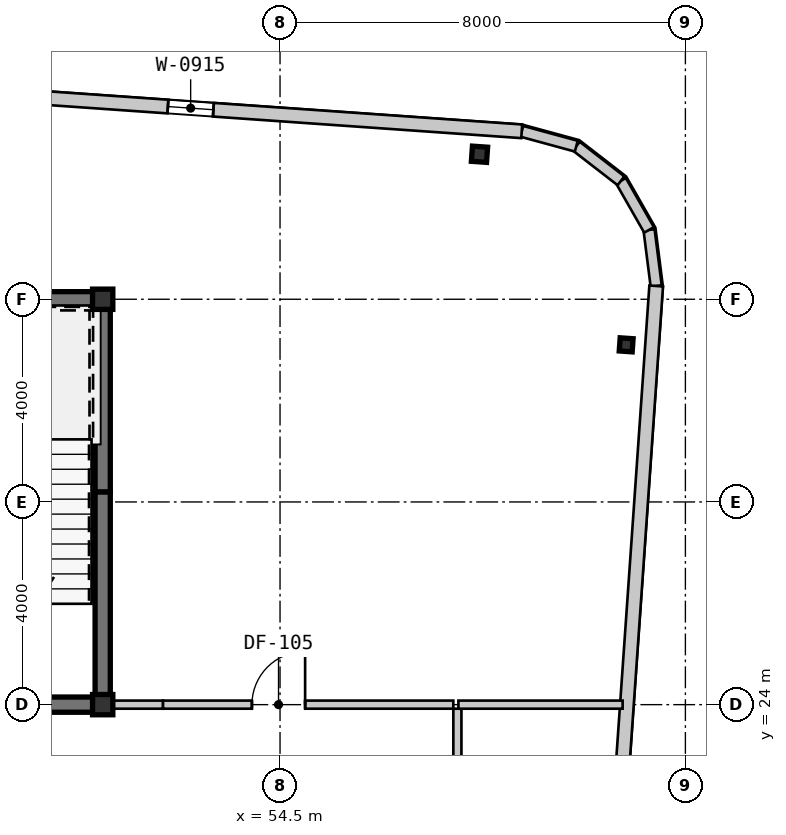
"""IFC4 building model, lengths in metres.
Left out: names, types, materials, properties, quantities, classifications, styles, units other than length and angle.
Written with IfcOpenShell. Run it as: python <this file> out.ifc"""

import sys

from ifc_helpers import new_model, si_unit, direction, frame, frame_2d, origin, origin_2d, place, context, subcontext, project, spatial, rectangle, hollow_rectangle, i_section, extrude, source, transform, mapped, element, fill, save


model = new_model("IFC4")
c1 = context("Model", 3, precision=1e-05, world=origin(), true_north=direction((0.0, 1.0)))
c2 = subcontext(c1, "Body", "Model", "MODEL_VIEW")
j1 = project(units=[si_unit("LENGTHUNIT", "METRE"), si_unit("PLANEANGLEUNIT", "RADIAN")], contexts=[c1])
p1 = place(None, origin())
s1 = spatial("IfcSite", under=j1, at=p1, CompositionType="ELEMENT")
p2 = place(p1, origin())
s2 = spatial("IfcBuilding", under=s1, at=p2, CompositionType="ELEMENT")
p3 = place(p2, frame((0.0, 0.0, 164.5)))
s3 = spatial("IfcBuildingStorey", under=s2, at=p3, CompositionType="ELEMENT", Elevation=164.5)
m1 = source(origin(), c2, "Body", "SweptSolid", [
    extrude(hollow_rectangle(XDim=0.4, YDim=0.4, WallThickness=0.016, at=origin_2d()), origin(), (0.0, 0.0, 1.0), 4.2),
])
for number, where, z_axis, x_axis in (
    (1, (51.0, 24.0, 0.0), (0.0, 0.0, 1.0), (1.0, 0.0, 0.0)),
    (2, (51.0, 32.0, 0.0), (0.0, 0.0, 1.0), (1.0, 0.0, 0.0)),
):
    element("IfcColumn", number, at=place(p3, frame(where, z_axis=z_axis, x_axis=x_axis)), inside=s3, PredefinedType="COLUMN", context=c2, shape_type="MappedRepresentation", body=[
        mapped(m1, transform((0.0, 0.0, 0.0), scale=1.0)),
    ])
m2 = source(origin(), c2, "Body", "SweptSolid", [
    extrude(hollow_rectangle(XDim=0.3, YDim=0.3, WallThickness=0.012, at=origin_2d()), origin(), (0.0, 0.0, 1.0), 4.2),
])
p4 = place(p3, frame((58.437, 34.862, 0.0), z_axis=(0.0, 0.0, 1.0), x_axis=(0.99756405026, -0.069756473744, 0.0)))
e3 = element("IfcColumn", 3, at=p4, inside=s3, PredefinedType="COLUMN", context=c2, shape_type="MappedRepresentation", body=[
    mapped(m2, transform((0.0, 0.0, 0.0), scale=1.0)),
])
m3 = source(origin(), c2, "Body", "SweptSolid", [
    extrude(i_section(OverallWidth=0.256, OverallDepth=0.26, WebThickness=0.01, FlangeThickness=0.017, at=origin_2d()), origin(), (0.0, 0.0, 1.0), 4.2),
])
p5 = place(p3, frame((61.331, 31.101, 0.0), z_axis=(0.0, 0.0, 1.0), x_axis=(0.99756405026, -0.069756473744, 0.0)))
e4 = element("IfcColumn", 4, at=p5, inside=s3, PredefinedType="COLUMN", context=c2, shape_type="MappedRepresentation", body=[
    mapped(m3, transform((0.0, 0.0, 0.0), scale=1.0)),
])
m4 = source(origin(), c2, "Body", "SweptSolid", [
    extrude(rectangle(XDim=1.116, YDim=0.22, at=frame_2d((0.558, 0.0))), origin(), (0.0, 0.0, 1.0), 3.78),
])
for number, where, z_axis, x_axis in (
    (5, (61.924, 32.262, 0.0), (0.0, 0.0, 1.0), (-0.126, 0.992, 0.0)),
    (6, (61.783, 33.369, 0.0), (0.0, 0.0, 1.0), (-0.496, 0.868, 0.0)),
    (7, (61.229, 34.338, 0.0), (0.0, 0.0, 1.0), (-0.791, 0.612, 0.0)),
    (8, (60.347, 35.021, 0.0), (0.0, 0.0, 1.0), (-0.965, 0.263, 0.0)),
):
    element("IfcWall", number, at=place(p3, frame(where, z_axis=z_axis, x_axis=x_axis)), inside=s3, PredefinedType="SOLIDWALL", context=c2, shape_type="MappedRepresentation", body=[
        mapped(m4, transform((0.0, 0.0, 0.0), scale=1.0)),
    ])
m5 = source(origin(), c2, "Body", "SweptSolid", [
    extrude(rectangle(XDim=46.0, YDim=0.27, at=frame_2d((23.0, 0.0))), origin(), (0.0, 0.0, 1.0), 3.78),
])
p6 = place(p3, frame((59.27, 35.314, 0.0), z_axis=(0.0, 0.0, 1.0), x_axis=(-0.997563767273, 0.069760520529, 0.0)))
e9 = element("IfcWall", 9, at=p6, inside=s3, PredefinedType="SOLIDWALL", context=c2, shape_type="MappedRepresentation", body=[
    mapped(m5, transform((0.0, 0.0, 0.0), scale=1.0)),
])
m6 = source(origin(), c2, "Body", "SweptSolid", [
    extrude(rectangle(XDim=0.9, YDim=1.5, at=frame_2d((0.45, 0.75))), frame((0.0, 0.145, 0.0), z_axis=(0.0, -1.0, 0.0), x_axis=(1.0, 0.0, 0.0)), (0.0, 0.0, 1.0), 0.29),
])
p7 = place(p6, frame((6.1, 0.0, 1.9)))
e10 = element("IfcOpeningElement", 10, at=p7, cuts=e9, PredefinedType="OPENING", context=c2, shape_type="MappedRepresentation", body=[
    mapped(m6, transform((0.0, 0.0, 0.0), scale=1.0)),
])
p8 = place(p6, frame((42.3, 0.0, 1.7)))
e11 = element("IfcOpeningElement", 11, at=p8, cuts=e9, PredefinedType="OPENING", context=c2, shape_type="MappedRepresentation", body=[
    mapped(m6, transform((0.0, 0.0, 0.0), scale=1.0)),
])
m7 = source(origin(), c2, "Body", "SweptSolid", [
    extrude(rectangle(XDim=28.0, YDim=0.27, at=frame_2d((14.0, 0.0))), origin(), (0.0, 0.0, 1.0), 3.78),
])
p9 = place(p3, frame((59.97, 4.33, 0.0), z_axis=(0.0, 0.0, 1.0), x_axis=(0.069754853754, 0.997564163539, 0.0)))
e12 = element("IfcWall", 12, at=p9, inside=s3, PredefinedType="SOLIDWALL", context=c2, shape_type="MappedRepresentation", body=[
    mapped(m7, transform((0.0, 0.0, 0.0), scale=1.0)),
])
m8 = source(origin(), c2, "Body", "SweptSolid", [
    extrude(rectangle(XDim=11.95, YDim=0.3, at=frame_2d((5.975, 0.0))), origin(), (0.0, 0.0, 1.0), 3.78),
])
p10 = place(p3, frame((39.2, 32.0, 0.0), z_axis=(0.0, 0.0, 1.0), x_axis=(1.0, 0.0, 0.0)))
e13 = element("IfcWall", 13, at=p10, inside=s3, PredefinedType="SHEAR", context=c2, shape_type="MappedRepresentation", body=[
    mapped(m8, transform((0.0, 0.0, 0.0), scale=1.0)),
])
m9 = source(origin(), c2, "Body", "SweptSolid", [
    extrude(rectangle(XDim=4.05, YDim=0.3, at=frame_2d((2.025, 0.0))), origin(), (0.0, 0.0, 1.0), 3.78),
])
p11 = place(p3, frame((51.0, 24.15, 0.0), z_axis=(0.0, 0.0, 1.0), x_axis=(0.0, 1.0, 0.0)))
e14 = element("IfcWall", 14, at=p11, inside=s3, PredefinedType="SHEAR", context=c2, shape_type="MappedRepresentation", body=[
    mapped(m9, transform((0.0, 0.0, 0.0), scale=1.0)),
])
m10 = source(origin(), c2, "Body", "SweptSolid", [
    extrude(rectangle(XDim=3.65, YDim=0.3, at=frame_2d((1.825, 0.0))), origin(), (0.0, 0.0, 1.0), 3.78),
])
p12 = place(p3, frame((51.0, 28.2, 0.0), z_axis=(0.0, 0.0, 1.0), x_axis=(0.0, 1.0, 0.0)))
e15 = element("IfcWall", 15, at=p12, inside=s3, PredefinedType="SHEAR", context=c2, shape_type="MappedRepresentation", body=[
    mapped(m10, transform((0.0, 0.0, 0.0), scale=1.0)),
])
m11 = source(origin(), c2, "Body", "SweptSolid", [
    extrude(rectangle(XDim=4.9, YDim=0.3, at=frame_2d((2.45, 0.0))), origin(), (0.0, 0.0, 1.0), 3.78),
])
p13 = place(p3, frame((46.25, 24.0, 0.0), z_axis=(0.0, 0.0, 1.0), x_axis=(1.0, 0.0, 0.0)))
e16 = element("IfcWall", 16, at=p13, inside=s3, PredefinedType="SHEAR", context=c2, shape_type="MappedRepresentation", body=[
    mapped(m11, transform((0.0, 0.0, 0.0), scale=1.0)),
])
m12 = source(origin(), c2, "Body", "SweptSolid", [
    extrude(rectangle(XDim=1.041, YDim=0.16, at=frame_2d((0.521, 0.0))), origin(), (0.0, 0.0, 1.0), 2.28),
])
p14 = place(p3, frame((51.15, 24.0, 0.0), z_axis=(0.0, 0.0, 1.0), x_axis=(1.0, 0.0, 0.0)))
e17 = element("IfcWall", 17, at=p14, inside=s3, PredefinedType="PARTITIONING", context=c2, shape_type="MappedRepresentation", body=[
    mapped(m12, transform((0.0, 0.0, 0.0), scale=1.0)),
])
m13 = source(origin(), c2, "Body", "SweptSolid", [
    extrude(rectangle(XDim=5.729, YDim=0.16, at=frame_2d((2.865, 0.0))), origin(), (0.0, 0.0, 1.0), 3.78),
])
p15 = place(p3, frame((52.191, 24.0, 0.0), z_axis=(0.0, 0.0, 1.0), x_axis=(1.0, 0.0, 0.0)))
e18 = element("IfcWall", 18, at=p15, inside=s3, PredefinedType="PARTITIONING", context=c2, shape_type="MappedRepresentation", body=[
    mapped(m13, transform((0.0, 0.0, 0.0), scale=1.0)),
])
m14 = source(origin(), c2, "Body", "SweptSolid", [
    extrude(rectangle(XDim=1.05, YDim=2.1, at=frame_2d((0.525, 1.05))), frame((0.0, 0.09, 0.0), z_axis=(0.0, -1.0, 0.0), x_axis=(1.0, 0.0, 0.0)), (0.0, 0.0, 1.0), 0.18),
])
p16 = place(p15, frame((1.754, 0.0, 0.0)))
e19 = element("IfcOpeningElement", 19, at=p16, cuts=e18, PredefinedType="OPENING", context=c2, shape_type="MappedRepresentation", body=[
    mapped(m14, transform((0.0, 0.0, 0.0), scale=1.0)),
])
m15 = source(origin(), c2, "Body", "SweptSolid", [
    extrude(rectangle(XDim=2.44, YDim=0.16, at=frame_2d((1.22, 0.0))), origin(), (0.0, 0.0, 1.0), 3.78),
])
p17 = place(p3, frame((58.0, 23.92, 0.0), z_axis=(0.0, 0.0, 1.0), x_axis=(0.0, -1.0, 0.0)))
e20 = element("IfcWall", 20, at=p17, inside=s3, PredefinedType="PARTITIONING", context=c2, shape_type="MappedRepresentation", body=[
    mapped(m15, transform((0.0, 0.0, 0.0), scale=1.0)),
])
m16 = source(origin(), c2, "Body", "SweptSolid", [
    extrude(rectangle(XDim=3.241, YDim=0.16, at=frame_2d((1.621, 0.0))), origin(), (0.0, 0.0, 1.0), 3.78),
])
p18 = place(p3, frame((61.261, 24.0, 0.0), z_axis=(0.0, 0.0, 1.0), x_axis=(-1.0, 0.0, 0.0)))
e21 = element("IfcWall", 21, at=p18, inside=s3, PredefinedType="PARTITIONING", context=c2, shape_type="MappedRepresentation", body=[
    mapped(m16, transform((0.0, 0.0, 0.0), scale=1.0)),
])
m17 = source(origin(), c2, "Body", "SweptSolid", [
    extrude(rectangle(XDim=0.9, YDim=1.5, at=frame_2d((0.45, 0.75))), frame((0.0, 0.03, 0.0), z_axis=(0.0, -1.0, 0.0), x_axis=(1.0, 0.0, 0.0)), (0.0, 0.0, 1.0), 0.06),
])
p19 = place(p7, origin())
e22 = element("IfcWindow", 22, at=p19, inside=s3, PartitioningType="SINGLE_PANEL", PredefinedType="WINDOW", context=c2, shape_type="MappedRepresentation", body=[
    mapped(m17, transform((0.0, 0.0, 0.0), scale=1.0)),
])
fill(e10, e22)
m18 = source(origin(), c2, "Body", "SweptSolid", [
    extrude(rectangle(XDim=1.05, YDim=2.1, at=frame_2d((0.525, 1.05))), frame((0.0, 0.025, 0.0), z_axis=(0.0, -1.0, 0.0), x_axis=(1.0, 0.0, 0.0)), (0.0, 0.0, 1.0), 0.05),
])
p20 = place(p16, origin())
e23 = element("IfcDoor", 23, at=p20, inside=s3, OperationType="SINGLE_SWING_RIGHT", PredefinedType="DOOR", context=c2, shape_type="MappedRepresentation", body=[
    mapped(m18, transform((0.0, 0.0, 0.0), scale=1.0)),
])
fill(e19, e23)
save(model, sys.argv[1])
